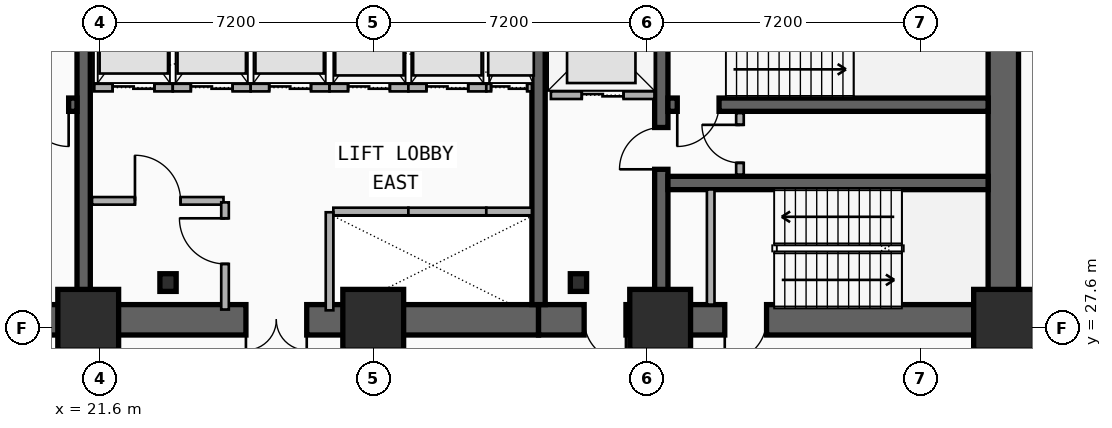
"""IFC4 building model, lengths in metres.
Left out: names, types, materials, properties, quantities, classifications, styles, units other than length and angle.
Written with IfcOpenShell. Run it as: python <this file> out.ifc"""

import sys

from ifc_helpers import new_model, si_unit, direction, frame, frame_2d, origin, origin_2d, place, context, subcontext, project, spatial, rectangle, i_section, extrude, element, fill, save


model = new_model("IFC4")
c1 = context("Model", 3, precision=1e-05, world=origin(), true_north=direction((0.0, 1.0)))
c2 = subcontext(c1, "Body", "Model", "MODEL_VIEW")
j1 = project(units=[si_unit("LENGTHUNIT", "METRE"), si_unit("PLANEANGLEUNIT", "RADIAN")], contexts=[c1])
p1 = place(None, origin())
s1 = spatial("IfcSite", under=j1, at=p1, CompositionType="ELEMENT")
p2 = place(p1, origin())
s2 = spatial("IfcBuilding", under=s1, at=p2, CompositionType="ELEMENT")
p3 = place(p2, frame((0.0, 0.0, 19.4)))
s3 = spatial("IfcBuildingStorey", under=s2, at=p3, CompositionType="ELEMENT", Elevation=19.4)
p4 = place(p3, frame((21.18, 27.82, 0.0), z_axis=(0.0, 0.0, 1.0), x_axis=(-1.0, 0.0, 0.0)))
e1 = element("IfcWall", 1, at=p4, inside=s3, PredefinedType="SHEAR", context=c2, shape_type="SweptSolid", body=[
    extrude(rectangle(XDim=9.03, YDim=0.8, at=frame_2d((4.515, 0.0))), origin(), (0.0, 0.0, 1.0), 4.8),
])
p5 = place(p4, frame((2.68, 0.0, 0.0)))
e2 = element("IfcOpeningElement", 2, at=p5, cuts=e1, PredefinedType="OPENING", context=c2, shape_type="SweptSolid", body=[
    extrude(rectangle(XDim=1.1, YDim=2.15, at=frame_2d((0.55, 1.075))), frame((0.0, 0.41, 0.0), z_axis=(0.0, -1.0, 0.0), x_axis=(1.0, 0.0, 0.0)), (0.0, 0.0, 1.0), 0.82),
])
p6 = place(p3, frame((33.15, 27.82, 0.0), z_axis=(0.0, 0.0, 1.0), x_axis=(-1.0, 0.0, 0.0)))
e3 = element("IfcWall", 3, at=p6, inside=s3, PredefinedType="SHEAR", context=c2, shape_type="SweptSolid", body=[
    extrude(rectangle(XDim=11.97, YDim=0.8, at=frame_2d((5.985, 0.0))), origin(), (0.0, 0.0, 1.0), 4.8),
])
p7 = place(p6, frame((6.1, 0.0, 0.0)))
e4 = element("IfcOpeningElement", 4, at=p7, cuts=e3, PredefinedType="OPENING", context=c2, shape_type="SweptSolid", body=[
    extrude(rectangle(XDim=1.6, YDim=2.2, at=frame_2d((0.8, 1.1))), frame((0.0, 0.41, 0.0), z_axis=(0.0, -1.0, 0.0), x_axis=(1.0, 0.0, 0.0)), (0.0, 0.0, 1.0), 0.82),
])
p8 = place(p3, frame((45.38, 27.82, 0.0), z_axis=(0.0, 0.0, 1.0), x_axis=(-1.0, 0.0, 0.0)))
e5 = element("IfcWall", 5, at=p8, inside=s3, PredefinedType="SHEAR", context=c2, shape_type="SweptSolid", body=[
    extrude(rectangle(XDim=12.23, YDim=0.8, at=frame_2d((6.115, 0.0))), origin(), (0.0, 0.0, 1.0), 4.8),
])
p9 = place(p8, frame((9.93, 0.0, 0.0)))
e6 = element("IfcOpeningElement", 6, at=p9, cuts=e5, PredefinedType="OPENING", context=c2, shape_type="SweptSolid", body=[
    extrude(rectangle(XDim=1.1, YDim=2.15, at=frame_2d((0.55, 1.075))), frame((0.0, 0.41, 0.0), z_axis=(0.0, -1.0, 0.0), x_axis=(1.0, 0.0, 0.0)), (0.0, 0.0, 1.0), 0.82),
])
p10 = place(p8, frame((6.23, 0.0, 0.0)))
e7 = element("IfcOpeningElement", 7, at=p10, cuts=e5, PredefinedType="OPENING", context=c2, shape_type="SweptSolid", body=[
    extrude(rectangle(XDim=1.1, YDim=2.15, at=frame_2d((0.55, 1.075))), frame((0.0, 0.41, 0.0), z_axis=(0.0, -1.0, 0.0), x_axis=(1.0, 0.0, 0.0)), (0.0, 0.0, 1.0), 0.82),
])
p11 = place(p3, frame((45.38, 28.22, 0.0), z_axis=(0.0, 0.0, 1.0), x_axis=(0.0, 1.0, 0.0)))
e8 = element("IfcWall", 8, at=p11, inside=s3, PredefinedType="SHEAR", context=c2, shape_type="SweptSolid", body=[
    extrude(rectangle(XDim=8.43, YDim=0.8, at=frame_2d((4.215, 0.0))), origin(), (0.0, 0.0, 1.0), 4.8),
])
for number, where, z_axis, x_axis in (
    (9, (21.18, 28.22, 0.0), (0.0, 0.0, 1.0), (0.0, 1.0, 0.0)),
    (10, (33.15, 28.22, 0.0), (0.0, 0.0, 1.0), (0.0, 1.0, 0.0)),
):
    element("IfcWall", number, at=place(p3, frame(where, z_axis=z_axis, x_axis=x_axis)), inside=s3, PredefinedType="SHEAR", context=c2, shape_type="SweptSolid", body=[
        extrude(rectangle(XDim=8.43, YDim=0.35, at=frame_2d((4.215, 0.0))), origin(), (0.0, 0.0, 1.0), 4.8),
    ])
p12 = place(p3, frame((36.38, 28.22, 0.0), z_axis=(0.0, 0.0, 1.0), x_axis=(0.0, 1.0, 0.0)))
e11 = element("IfcWall", 11, at=p12, inside=s3, PredefinedType="SHEAR", context=c2, shape_type="SweptSolid", body=[
    extrude(rectangle(XDim=8.43, YDim=0.35, at=frame_2d((4.215, 0.0))), origin(), (0.0, 0.0, 1.0), 4.8),
])
p13 = place(p12, frame((3.56, 0.0, 0.0)))
e12 = element("IfcOpeningElement", 12, at=p13, cuts=e11, PredefinedType="OPENING", context=c2, shape_type="SweptSolid", body=[
    extrude(rectangle(XDim=1.1, YDim=2.15, at=frame_2d((0.55, 1.075))), frame((0.0, 0.185, 0.0), z_axis=(0.0, -1.0, 0.0), x_axis=(1.0, 0.0, 0.0)), (0.0, 0.0, 1.0), 0.37),
])
p14 = place(p3, frame((21.005, 33.48, 0.0), z_axis=(0.0, 0.0, 1.0), x_axis=(-1.0, 0.0, 0.0)))
e13 = element("IfcWall", 13, at=p14, inside=s3, PredefinedType="SHEAR", context=c2, shape_type="SweptSolid", body=[
    extrude(rectangle(XDim=8.455, YDim=0.35, at=frame_2d((4.228, 0.0))), origin(), (0.0, 0.0, 1.0), 4.8),
])
p15 = place(p14, frame((0.22, 0.0, 0.0)))
e14 = element("IfcOpeningElement", 14, at=p15, cuts=e13, PredefinedType="OPENING", context=c2, shape_type="SweptSolid", body=[
    extrude(rectangle(XDim=1.1, YDim=2.15, at=frame_2d((0.55, 1.075))), frame((0.0, 0.185, 0.0), z_axis=(0.0, -1.0, 0.0), x_axis=(1.0, 0.0, 0.0)), (0.0, 0.0, 1.0), 0.37),
])
p16 = place(p3, frame((44.98, 33.48, 0.0), z_axis=(0.0, 0.0, 1.0), x_axis=(-1.0, 0.0, 0.0)))
e15 = element("IfcWall", 15, at=p16, inside=s3, PredefinedType="SHEAR", context=c2, shape_type="SweptSolid", body=[
    extrude(rectangle(XDim=8.425, YDim=0.35, at=frame_2d((4.212, 0.0))), origin(), (0.0, 0.0, 1.0), 4.8),
])
p17 = place(p16, frame((7.08, 0.0, 0.0)))
e16 = element("IfcOpeningElement", 16, at=p17, cuts=e15, PredefinedType="OPENING", context=c2, shape_type="SweptSolid", body=[
    extrude(rectangle(XDim=1.1, YDim=2.15, at=frame_2d((0.55, 1.075))), frame((0.0, 0.185, 0.0), z_axis=(0.0, -1.0, 0.0), x_axis=(1.0, 0.0, 0.0)), (0.0, 0.0, 1.0), 0.37),
])
p18 = place(p3, frame((36.555, 31.42, 0.0), z_axis=(0.0, 0.0, 1.0), x_axis=(1.0, 0.0, 0.0)))
e17 = element("IfcWall", 17, at=p18, inside=s3, PredefinedType="SHEAR", context=c2, shape_type="SweptSolid", body=[
    extrude(rectangle(XDim=8.425, YDim=0.35, at=frame_2d((4.212, 0.0))), origin(), (0.0, 0.0, 1.0), 4.8),
])
for number, where, z_axis, x_axis in (
    (18, (23.4, 28.8, 0.0), (0.0, 0.0, 1.0), (1.0, 0.0, 0.0)),
    (19, (34.2, 28.8, 0.0), (0.0, 0.0, 1.0), (1.0, 0.0, 0.0)),
):
    element("IfcColumn", number, at=place(p3, frame(where, z_axis=z_axis, x_axis=x_axis)), inside=s3, PredefinedType="COLUMN", context=c2, shape_type="SweptSolid", body=[
        extrude(i_section(OverallWidth=0.428, OverallDepth=0.465, WebThickness=0.045, FlangeThickness=0.073, FilletRadius=0.015, at=origin_2d()), origin(), (0.0, 0.0, 1.0), 4.8),
    ])
for number, where, z_axis, x_axis in (
    (20, (21.3, 27.82, 0.0), (0.0, 0.0, 1.0), (1.0, 0.0, 0.0)),
    (21, (28.8, 27.82, 0.0), (0.0, 0.0, 1.0), (1.0, 0.0, 0.0)),
    (22, (36.35, 27.82, 0.0), (0.0, 0.0, 1.0), (1.0, 0.0, 0.0)),
    (23, (45.4, 27.82, 0.0), (0.0, 0.0, 1.0), (1.0, 0.0, 0.0)),
):
    element("IfcColumn", number, at=place(p3, frame(where, z_axis=z_axis, x_axis=x_axis)), inside=s3, PredefinedType="COLUMN", context=c2, shape_type="SweptSolid", body=[
        extrude(rectangle(XDim=1.6, YDim=1.6, at=origin_2d()), origin(), (0.0, 0.0, 1.0), 4.8),
    ])
p19 = place(p3, frame((33.475, 33.73, 0.0), z_axis=(0.0, 0.0, 1.0), x_axis=(1.0, 0.0, 0.0)))
e24 = element("IfcWall", 24, at=p19, inside=s3, PredefinedType="PARTITIONING", context=c2, shape_type="SweptSolid", body=[
    extrude(rectangle(XDim=2.725, YDim=0.2, at=frame_2d((1.362, 0.0))), origin(), (0.0, 0.0, 1.0), 3.472),
])
p20 = place(p19, frame((0.812, 0.0, 0.0)))
e25 = element("IfcOpeningElement", 25, at=p20, cuts=e24, PredefinedType="OPENING", context=c2, shape_type="SweptSolid", body=[
    extrude(rectangle(XDim=1.1, YDim=2.15, at=frame_2d((0.55, 1.075))), frame((0.0, 0.11, 0.0), z_axis=(0.0, -1.0, 0.0), x_axis=(1.0, 0.0, 0.0)), (0.0, 0.0, 1.0), 0.22),
])
p21 = place(p3, frame((27.75, 30.67, 0.0), z_axis=(0.0, 0.0, 1.0), x_axis=(1.0, 0.0, 0.0)))
e26 = element("IfcWall", 26, at=p21, inside=s3, PredefinedType="PARTITIONING", context=c2, shape_type="SweptSolid", body=[
    extrude(rectangle(XDim=1.975, YDim=0.2, at=frame_2d((0.988, 0.0))), origin(), (0.0, 0.0, 1.0), 3.472),
])
p22 = place(p3, frame((27.65, 28.07, 0.0), z_axis=(0.0, 0.0, 1.0), x_axis=(0.0, 1.0, 0.0)))
e27 = element("IfcWall", 27, at=p22, inside=s3, PredefinedType="PARTITIONING", context=c2, shape_type="SweptSolid", body=[
    extrude(rectangle(XDim=2.58, YDim=0.2, at=frame_2d((1.29, 0.0))), origin(), (0.0, 0.0, 1.0), 3.472),
])
p23 = place(p3, frame((29.725, 30.67, 0.0), z_axis=(0.0, 0.0, 1.0), x_axis=(1.0, 0.0, 0.0)))
e28 = element("IfcWall", 28, at=p23, inside=s3, PredefinedType="PARTITIONING", context=c2, shape_type="SweptSolid", body=[
    extrude(rectangle(XDim=2.05, YDim=0.2, at=frame_2d((1.025, 0.0))), origin(), (0.0, 0.0, 1.0), 4.5),
])
p24 = place(p3, frame((31.775, 30.67, 0.0), z_axis=(0.0, 0.0, 1.0), x_axis=(1.0, 0.0, 0.0)))
e29 = element("IfcWall", 29, at=p24, inside=s3, PredefinedType="PARTITIONING", context=c2, shape_type="SweptSolid", body=[
    extrude(rectangle(XDim=1.2, YDim=0.2, at=frame_2d((0.6, 0.0))), origin(), (0.0, 0.0, 1.0), 4.5),
])
p25 = place(p3, frame((21.46, 33.93, 0.0), z_axis=(0.0, 0.0, 1.0), x_axis=(1.0, 0.0, 0.0)))
e30 = element("IfcWall", 30, at=p25, inside=s3, PredefinedType="PARTITIONING", context=c2, shape_type="SweptSolid", body=[
    extrude(rectangle(XDim=2.065, YDim=0.2, at=frame_2d((1.032, 0.0))), origin(), (0.0, 0.0, 1.0), 3.472),
])
p26 = place(p25, frame((0.482, 0.0, 0.0)))
e31 = element("IfcOpeningElement", 31, at=p26, cuts=e30, PredefinedType="OPENING", context=c2, shape_type="SweptSolid", body=[
    extrude(rectangle(XDim=1.1, YDim=2.15, at=frame_2d((0.55, 1.075))), frame((0.0, 0.11, 0.0), z_axis=(0.0, -1.0, 0.0), x_axis=(1.0, 0.0, 0.0)), (0.0, 0.0, 1.0), 0.22),
])
p27 = place(p3, frame((23.525, 33.93, 0.0), z_axis=(0.0, 0.0, 1.0), x_axis=(1.0, 0.0, 0.0)))
e32 = element("IfcWall", 32, at=p27, inside=s3, PredefinedType="PARTITIONING", context=c2, shape_type="SweptSolid", body=[
    extrude(rectangle(XDim=2.05, YDim=0.2, at=frame_2d((1.025, 0.0))), origin(), (0.0, 0.0, 1.0), 4.5),
])
p28 = place(p27, frame((0.475, 0.0, 0.0)))
e33 = element("IfcOpeningElement", 33, at=p28, cuts=e32, PredefinedType="OPENING", context=c2, shape_type="SweptSolid", body=[
    extrude(rectangle(XDim=1.1, YDim=2.15, at=frame_2d((0.55, 1.075))), frame((0.0, 0.11, 0.0), z_axis=(0.0, -1.0, 0.0), x_axis=(1.0, 0.0, 0.0)), (0.0, 0.0, 1.0), 0.22),
])
p29 = place(p3, frame((25.575, 33.93, 0.0), z_axis=(0.0, 0.0, 1.0), x_axis=(1.0, 0.0, 0.0)))
e34 = element("IfcWall", 34, at=p29, inside=s3, PredefinedType="PARTITIONING", context=c2, shape_type="SweptSolid", body=[
    extrude(rectangle(XDim=2.075, YDim=0.2, at=frame_2d((1.038, 0.0))), origin(), (0.0, 0.0, 1.0), 4.5),
])
p30 = place(p29, frame((0.488, 0.0, 0.0)))
e35 = element("IfcOpeningElement", 35, at=p30, cuts=e34, PredefinedType="OPENING", context=c2, shape_type="SweptSolid", body=[
    extrude(rectangle(XDim=1.1, YDim=2.15, at=frame_2d((0.55, 1.075))), frame((0.0, 0.11, 0.0), z_axis=(0.0, -1.0, 0.0), x_axis=(1.0, 0.0, 0.0)), (0.0, 0.0, 1.0), 0.22),
])
p31 = place(p3, frame((27.65, 33.93, 0.0), z_axis=(0.0, 0.0, 1.0), x_axis=(1.0, 0.0, 0.0)))
e36 = element("IfcWall", 36, at=p31, inside=s3, PredefinedType="PARTITIONING", context=c2, shape_type="SweptSolid", body=[
    extrude(rectangle(XDim=2.075, YDim=0.2, at=frame_2d((1.038, 0.0))), origin(), (0.0, 0.0, 1.0), 3.472),
])
p32 = place(p31, frame((0.488, 0.0, 0.0)))
e37 = element("IfcOpeningElement", 37, at=p32, cuts=e36, PredefinedType="OPENING", context=c2, shape_type="SweptSolid", body=[
    extrude(rectangle(XDim=1.1, YDim=2.15, at=frame_2d((0.55, 1.075))), frame((0.0, 0.11, 0.0), z_axis=(0.0, -1.0, 0.0), x_axis=(1.0, 0.0, 0.0)), (0.0, 0.0, 1.0), 0.22),
])
p33 = place(p3, frame((29.725, 33.93, 0.0), z_axis=(0.0, 0.0, 1.0), x_axis=(1.0, 0.0, 0.0)))
e38 = element("IfcWall", 38, at=p33, inside=s3, PredefinedType="PARTITIONING", context=c2, shape_type="SweptSolid", body=[
    extrude(rectangle(XDim=2.05, YDim=0.2, at=frame_2d((1.025, 0.0))), origin(), (0.0, 0.0, 1.0), 4.5),
])
p34 = place(p33, frame((0.475, 0.0, 0.0)))
e39 = element("IfcOpeningElement", 39, at=p34, cuts=e38, PredefinedType="OPENING", context=c2, shape_type="SweptSolid", body=[
    extrude(rectangle(XDim=1.1, YDim=2.15, at=frame_2d((0.55, 1.075))), frame((0.0, 0.11, 0.0), z_axis=(0.0, -1.0, 0.0), x_axis=(1.0, 0.0, 0.0)), (0.0, 0.0, 1.0), 0.22),
])
p35 = place(p3, frame((31.775, 33.93, 0.0), z_axis=(0.0, 0.0, 1.0), x_axis=(1.0, 0.0, 0.0)))
e40 = element("IfcWall", 40, at=p35, inside=s3, PredefinedType="PARTITIONING", context=c2, shape_type="SweptSolid", body=[
    extrude(rectangle(XDim=1.2, YDim=0.2, at=frame_2d((0.6, 0.0))), origin(), (0.0, 0.0, 1.0), 4.5),
])
p36 = place(p35, frame((0.125, 0.0, 0.0)))
e41 = element("IfcOpeningElement", 41, at=p36, cuts=e40, PredefinedType="OPENING", context=c2, shape_type="SweptSolid", body=[
    extrude(rectangle(XDim=0.95, YDim=2.15, at=frame_2d((0.475, 1.075))), frame((0.0, 0.11, 0.0), z_axis=(0.0, -1.0, 0.0), x_axis=(1.0, 0.0, 0.0)), (0.0, 0.0, 1.0), 0.22),
])
p37 = place(p3, frame((37.68, 28.22, 0.0), z_axis=(0.0, 0.0, 1.0), x_axis=(0.0, 1.0, 0.0)))
e42 = element("IfcWall", 42, at=p37, inside=s3, PredefinedType="PARTITIONING", context=c2, shape_type="SweptSolid", body=[
    extrude(rectangle(XDim=3.03, YDim=0.2, at=frame_2d((1.515, 0.0))), origin(), (0.0, 0.0, 1.0), 4.5),
])
p38 = place(p3, frame((38.45, 31.64, 0.0), z_axis=(0.0, 0.0, 1.0), x_axis=(0.0, 1.0, 0.0)))
e43 = element("IfcWall", 43, at=p38, inside=s3, PredefinedType="PARTITIONING", context=c2, shape_type="SweptSolid", body=[
    extrude(rectangle(XDim=1.62, YDim=0.2, at=frame_2d((0.81, 0.0))), origin(), (0.0, 0.0, 1.0), 4.5),
])
p39 = place(p38, frame((0.31, 0.0, 0.0)))
e44 = element("IfcOpeningElement", 44, at=p39, cuts=e43, PredefinedType="OPENING", context=c2, shape_type="SweptSolid", body=[
    extrude(rectangle(XDim=1.0, YDim=2.15, at=frame_2d((0.5, 1.075))), frame((0.0, 0.11, 0.0), z_axis=(0.0, -1.0, 0.0), x_axis=(1.0, 0.0, 0.0)), (0.0, 0.0, 1.0), 0.22),
])
p40 = place(p3, frame((21.4, 30.95, 0.0), z_axis=(0.0, 0.0, 1.0), x_axis=(1.0, 0.0, 0.0)))
e45 = element("IfcWall", 45, at=p40, inside=s3, PredefinedType="PARTITIONING", context=c2, shape_type="SweptSolid", body=[
    extrude(rectangle(XDim=3.46, YDim=0.2, at=frame_2d((1.73, 0.0))), origin(), (0.0, 0.0, 1.0), 3.472),
])
p41 = place(p40, frame((1.13, 0.0, 0.0)))
e46 = element("IfcOpeningElement", 46, at=p41, cuts=e45, PredefinedType="OPENING", context=c2, shape_type="SweptSolid", body=[
    extrude(rectangle(XDim=1.2, YDim=2.15, at=frame_2d((0.6, 1.075))), frame((0.0, 0.11, 0.0), z_axis=(0.0, -1.0, 0.0), x_axis=(1.0, 0.0, 0.0)), (0.0, 0.0, 1.0), 0.22),
])
p42 = place(p3, frame((24.9, 28.09, 0.0), z_axis=(0.0, 0.0, 1.0), x_axis=(0.0, 1.0, 0.0)))
e47 = element("IfcWall", 47, at=p42, inside=s3, PredefinedType="PARTITIONING", context=c2, shape_type="SweptSolid", body=[
    extrude(rectangle(XDim=2.82, YDim=0.2, at=frame_2d((1.41, 0.0))), origin(), (0.0, 0.0, 1.0), 4.5),
])
p43 = place(p42, frame((1.201, 0.0, 0.0)))
e48 = element("IfcOpeningElement", 48, at=p43, cuts=e47, PredefinedType="OPENING", context=c2, shape_type="SweptSolid", body=[
    extrude(rectangle(XDim=1.2, YDim=2.15, at=frame_2d((0.6, 1.075))), frame((0.0, 0.11, 0.0), z_axis=(0.0, -1.0, 0.0), x_axis=(1.0, 0.0, 0.0)), (0.0, 0.0, 1.0), 0.22),
])
p44 = place(p3, frame((45.41, 27.6, 0.0), z_axis=(0.0, 0.0, 1.0), x_axis=(1.0, 0.0, 0.0)))
e49 = element("IfcWall", 49, at=p44, inside=s3, PredefinedType="PARTITIONING", context=c2, shape_type="SweptSolid", body=[
    extrude(rectangle(XDim=0.91, YDim=0.16, at=frame_2d((0.455, 0.0))), origin(), (0.0, 0.0, 1.0), 3.472),
])
p45 = place(p20, origin())
e50 = element("IfcDoor", 50, at=p45, inside=s3, OperationType="DOUBLE_DOOR_SLIDING", PredefinedType="DOOR", context=c2, shape_type="SweptSolid", body=[
    extrude(rectangle(XDim=1.1, YDim=2.15, at=frame_2d((0.55, 1.075))), frame((0.0, 0.025, 0.0), z_axis=(0.0, -1.0, 0.0), x_axis=(1.0, 0.0, 0.0)), (0.0, 0.0, 1.0), 0.05),
])
fill(e25, e50)
p46 = place(p26, origin())
e51 = element("IfcDoor", 51, at=p46, inside=s3, OperationType="DOUBLE_DOOR_SLIDING", PredefinedType="DOOR", context=c2, shape_type="SweptSolid", body=[
    extrude(rectangle(XDim=1.1, YDim=2.15, at=frame_2d((0.55, 1.075))), frame((0.0, 0.025, 0.0), z_axis=(0.0, -1.0, 0.0), x_axis=(1.0, 0.0, 0.0)), (0.0, 0.0, 1.0), 0.05),
])
fill(e31, e51)
p47 = place(p28, origin())
e52 = element("IfcDoor", 52, at=p47, inside=s3, OperationType="DOUBLE_DOOR_SLIDING", PredefinedType="DOOR", context=c2, shape_type="SweptSolid", body=[
    extrude(rectangle(XDim=1.1, YDim=2.15, at=frame_2d((0.55, 1.075))), frame((0.0, 0.025, 0.0), z_axis=(0.0, -1.0, 0.0), x_axis=(1.0, 0.0, 0.0)), (0.0, 0.0, 1.0), 0.05),
])
fill(e33, e52)
p48 = place(p30, origin())
e53 = element("IfcDoor", 53, at=p48, inside=s3, OperationType="DOUBLE_DOOR_SLIDING", PredefinedType="DOOR", context=c2, shape_type="SweptSolid", body=[
    extrude(rectangle(XDim=1.1, YDim=2.15, at=frame_2d((0.55, 1.075))), frame((0.0, 0.025, 0.0), z_axis=(0.0, -1.0, 0.0), x_axis=(1.0, 0.0, 0.0)), (0.0, 0.0, 1.0), 0.05),
])
fill(e35, e53)
p49 = place(p32, origin())
e54 = element("IfcDoor", 54, at=p49, inside=s3, OperationType="DOUBLE_DOOR_SLIDING", PredefinedType="DOOR", context=c2, shape_type="SweptSolid", body=[
    extrude(rectangle(XDim=1.1, YDim=2.15, at=frame_2d((0.55, 1.075))), frame((0.0, 0.025, 0.0), z_axis=(0.0, -1.0, 0.0), x_axis=(1.0, 0.0, 0.0)), (0.0, 0.0, 1.0), 0.05),
])
fill(e37, e54)
p50 = place(p34, origin())
e55 = element("IfcDoor", 55, at=p50, inside=s3, OperationType="DOUBLE_DOOR_SLIDING", PredefinedType="DOOR", context=c2, shape_type="SweptSolid", body=[
    extrude(rectangle(XDim=1.1, YDim=2.15, at=frame_2d((0.55, 1.075))), frame((0.0, 0.025, 0.0), z_axis=(0.0, -1.0, 0.0), x_axis=(1.0, 0.0, 0.0)), (0.0, 0.0, 1.0), 0.05),
])
fill(e39, e55)
p51 = place(p36, origin())
e56 = element("IfcDoor", 56, at=p51, inside=s3, OperationType="DOUBLE_DOOR_SLIDING", PredefinedType="DOOR", context=c2, shape_type="SweptSolid", body=[
    extrude(rectangle(XDim=0.95, YDim=2.15, at=frame_2d((0.475, 1.075))), frame((0.0, 0.025, 0.0), z_axis=(0.0, -1.0, 0.0), x_axis=(1.0, 0.0, 0.0)), (0.0, 0.0, 1.0), 0.05),
])
fill(e41, e56)
p52 = place(p15, origin())
e57 = element("IfcDoor", 57, at=p52, inside=s3, OperationType="SINGLE_SWING_LEFT", PredefinedType="DOOR", context=c2, shape_type="SweptSolid", body=[
    extrude(rectangle(XDim=1.1, YDim=2.15, at=frame_2d((0.55, 1.075))), frame((0.0, 0.025, 0.0), z_axis=(0.0, -1.0, 0.0), x_axis=(1.0, 0.0, 0.0)), (0.0, 0.0, 1.0), 0.05),
])
fill(e14, e57)
p53 = place(p17, origin())
e58 = element("IfcDoor", 58, at=p53, inside=s3, OperationType="SINGLE_SWING_RIGHT", PredefinedType="DOOR", context=c2, shape_type="SweptSolid", body=[
    extrude(rectangle(XDim=1.1, YDim=2.15, at=frame_2d((0.55, 1.075))), frame((0.0, 0.025, 0.0), z_axis=(0.0, -1.0, 0.0), x_axis=(1.0, 0.0, 0.0)), (0.0, 0.0, 1.0), 0.05),
])
fill(e16, e58)
p54 = place(p13, origin())
e59 = element("IfcDoor", 59, at=p54, inside=s3, OperationType="SINGLE_SWING_LEFT", PredefinedType="DOOR", context=c2, shape_type="SweptSolid", body=[
    extrude(rectangle(XDim=1.1, YDim=2.15, at=frame_2d((0.55, 1.075))), frame((0.0, 0.025, 0.0), z_axis=(0.0, -1.0, 0.0), x_axis=(1.0, 0.0, 0.0)), (0.0, 0.0, 1.0), 0.05),
])
fill(e12, e59)
p55 = place(p9, origin())
e60 = element("IfcDoor", 60, at=p55, inside=s3, OperationType="SINGLE_SWING_LEFT", PredefinedType="DOOR", context=c2, shape_type="SweptSolid", body=[
    extrude(rectangle(XDim=1.1, YDim=2.15, at=frame_2d((0.55, 1.075))), frame((0.0, 0.025, 0.0), z_axis=(0.0, -1.0, 0.0), x_axis=(1.0, 0.0, 0.0)), (0.0, 0.0, 1.0), 0.05),
])
fill(e6, e60)
p56 = place(p10, origin())
e61 = element("IfcDoor", 61, at=p56, inside=s3, OperationType="SINGLE_SWING_RIGHT", PredefinedType="DOOR", context=c2, shape_type="SweptSolid", body=[
    extrude(rectangle(XDim=1.1, YDim=2.15, at=frame_2d((0.55, 1.075))), frame((0.0, 0.025, 0.0), z_axis=(0.0, -1.0, 0.0), x_axis=(1.0, 0.0, 0.0)), (0.0, 0.0, 1.0), 0.05),
])
fill(e7, e61)
p57 = place(p7, origin())
e62 = element("IfcDoor", 62, at=p57, inside=s3, OperationType="SINGLE_SWING_LEFT", PredefinedType="DOOR", context=c2, shape_type="SweptSolid", body=[
    extrude(rectangle(XDim=1.6, YDim=2.2, at=frame_2d((0.8, 1.1))), frame((0.0, 0.025, 0.0), z_axis=(0.0, -1.0, 0.0), x_axis=(1.0, 0.0, 0.0)), (0.0, 0.0, 1.0), 0.05),
])
fill(e4, e62)
p58 = place(p39, origin())
e63 = element("IfcDoor", 63, at=p58, inside=s3, OperationType="SINGLE_SWING_RIGHT", PredefinedType="DOOR", context=c2, shape_type="SweptSolid", body=[
    extrude(rectangle(XDim=1.0, YDim=2.15, at=frame_2d((0.5, 1.075))), frame((0.0, 0.025, 0.0), z_axis=(0.0, -1.0, 0.0), x_axis=(1.0, 0.0, 0.0)), (0.0, 0.0, 1.0), 0.05),
])
fill(e44, e63)
p59 = place(p41, origin())
e64 = element("IfcDoor", 64, at=p59, inside=s3, OperationType="SINGLE_SWING_LEFT", PredefinedType="DOOR", context=c2, shape_type="SweptSolid", body=[
    extrude(rectangle(XDim=1.2, YDim=2.15, at=frame_2d((0.6, 1.075))), frame((0.0, 0.025, 0.0), z_axis=(0.0, -1.0, 0.0), x_axis=(1.0, 0.0, 0.0)), (0.0, 0.0, 1.0), 0.05),
])
fill(e46, e64)
p60 = place(p43, origin())
e65 = element("IfcDoor", 65, at=p60, inside=s3, OperationType="SINGLE_SWING_RIGHT", PredefinedType="DOOR", context=c2, shape_type="SweptSolid", body=[
    extrude(rectangle(XDim=1.2, YDim=2.15, at=frame_2d((0.6, 1.075))), frame((0.0, 0.025, 0.0), z_axis=(0.0, -1.0, 0.0), x_axis=(1.0, 0.0, 0.0)), (0.0, 0.0, 1.0), 0.05),
])
fill(e48, e65)
save(model, sys.argv[1])
